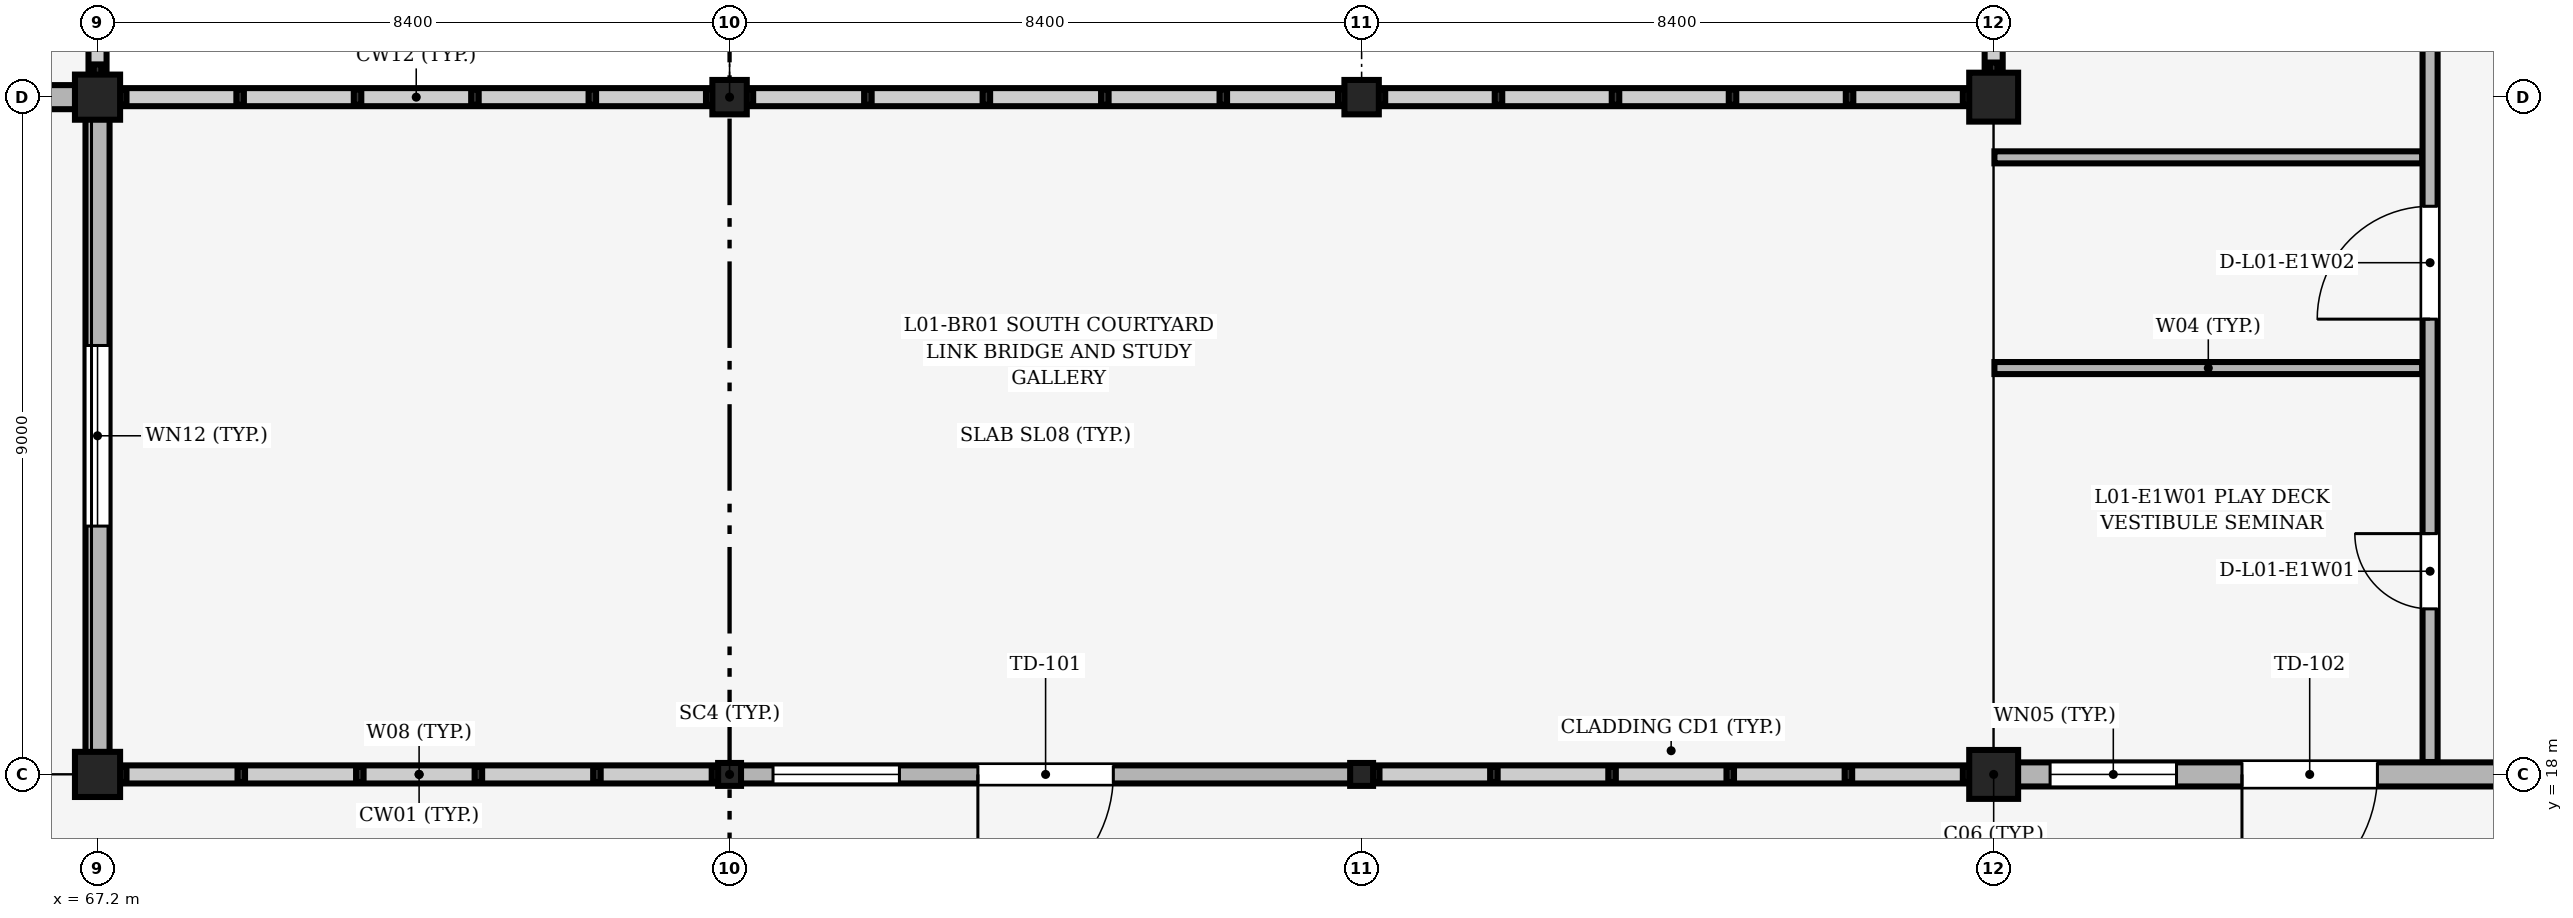
"""IFC4 building model, lengths in metres.
Left out: names, types, materials, properties, quantities, classifications, styles, units other than length and angle.
Written with IfcOpenShell. Run it as: python <this file> out.ifc"""

import sys

from ifc_helpers import new_model, si_unit, direction, frame, frame_2d, origin, origin_2d, place, context, subcontext, project, spatial, rectangle, hollow_rectangle, hollow_circle, extrude, element, fill, save


model = new_model("IFC4")
c1 = context("Model", 3, precision=1e-05, world=origin(), true_north=direction((0.0, 1.0)))
c2 = subcontext(c1, "Body", "Model", "MODEL_VIEW")
j1 = project(units=[si_unit("LENGTHUNIT", "METRE"), si_unit("PLANEANGLEUNIT", "RADIAN")], contexts=[c1])
p1 = place(None, origin())
s1 = spatial("IfcSite", under=j1, at=p1, CompositionType="ELEMENT")
p2 = place(p1, origin())
s2 = spatial("IfcBuilding", under=s1, at=p2, CompositionType="ELEMENT")
p3 = place(p2, frame((0.0, 0.0, 4.8)))
s3 = spatial("IfcBuildingStorey", under=s2, at=p3, CompositionType="ELEMENT", Elevation=4.8)
for number, where, z_axis, x_axis in (
    (1, (67.2, 18.0, 0.0), (0.0, 0.0, 1.0), (1.0, 0.0, 0.0)),
    (2, (67.2, 27.0, 0.0), (0.0, 0.0, 1.0), (1.0, 0.0, 0.0)),
):
    element("IfcColumn", number, at=place(p3, frame(where, z_axis=z_axis, x_axis=x_axis)), inside=s3, PredefinedType="COLUMN", context=c2, shape_type="SweptSolid", body=[
        extrude(rectangle(XDim=0.6, YDim=0.6, at=origin_2d()), origin(), (0.0, 0.0, 1.0), 4.2),
    ])
for number, where, z_axis, x_axis in (
    (3, (75.6, 18.0, 0.0), (0.0, 0.0, 1.0), (1.0, 0.0, 0.0)),
    (4, (84.0, 18.0, 0.0), (0.0, 0.0, 1.0), (1.0, 0.0, 0.0)),
):
    element("IfcColumn", number, at=place(p3, frame(where, z_axis=z_axis, x_axis=x_axis)), inside=s3, PredefinedType="COLUMN", context=c2, shape_type="SweptSolid", body=[
        extrude(hollow_rectangle(XDim=0.305, YDim=0.305, WallThickness=0.012, InnerFilletRadius=0.012, OuterFilletRadius=0.024, at=origin_2d()), origin(), (0.0, 0.0, 1.0), 4.2),
    ])
for number, where, z_axis, x_axis in (
    (5, (92.4, 18.0, 0.0), (0.0, 0.0, 1.0), (1.0, 0.0, 0.0)),
    (6, (92.4, 27.0, 0.0), (0.0, 0.0, 1.0), (1.0, 0.0, 0.0)),
):
    element("IfcColumn", number, at=place(p3, frame(where, z_axis=z_axis, x_axis=x_axis)), inside=s3, PredefinedType="COLUMN", context=c2, shape_type="SweptSolid", body=[
        extrude(rectangle(XDim=0.65, YDim=0.65, at=origin_2d()), origin(), (0.0, 0.0, 1.0), 4.2),
    ])
for number, where, z_axis, x_axis in (
    (7, (75.6, 27.0, 0.0), (0.0, 0.0, 1.0), (1.0, 0.0, 0.0)),
    (8, (84.0, 27.0, 0.0), (0.0, 0.0, 1.0), (1.0, 0.0, 0.0)),
):
    element("IfcColumn", number, at=place(p3, frame(where, z_axis=z_axis, x_axis=x_axis)), inside=s3, PredefinedType="USERDEFINED", context=c2, shape_type="SweptSolid", body=[
        extrude(hollow_circle(Radius=0.229, WallThickness=0.013, at=origin_2d()), origin(), (0.0, 0.0, 1.0), 4.2),
    ])
p4 = place(p3, frame((92.7, 18.0, 0.0), z_axis=(0.0, 0.0, 1.0), x_axis=(1.0, 0.0, 0.0)))
e9 = element("IfcWall", 9, at=p4, inside=s3, PredefinedType="SOLIDWALL", context=c2, shape_type="SweptSolid", body=[
    extrude(rectangle(XDim=7.8, YDim=0.32, at=frame_2d((3.9, 0.0))), origin(), (0.0, 0.0, 1.0), 3.15),
])
p5 = place(p4, frame((4.8, 0.0, 0.0), z_axis=(0.0, 0.0, 1.0), x_axis=(-1.0, 0.0, 0.0)))
e10 = element("IfcOpeningElement", 10, at=p5, cuts=e9, PredefinedType="OPENING", context=c2, shape_type="SweptSolid", body=[
    extrude(rectangle(XDim=1.8, YDim=2.3, at=frame_2d((0.9, 1.15))), frame((0.0, 0.17, 0.0), z_axis=(0.0, -1.0, 0.0), x_axis=(1.0, 0.0, 0.0)), (0.0, 0.0, 1.0), 0.34),
])
p6 = place(p4, frame((0.45, 0.0, 0.95)))
e11 = element("IfcOpeningElement", 11, at=p6, cuts=e9, PredefinedType="OPENING", context=c2, shape_type="SweptSolid", body=[
    extrude(rectangle(XDim=1.68, YDim=1.8, at=frame_2d((0.84, 0.9))), frame((0.0, 0.17, 0.0), z_axis=(0.0, -1.0, 0.0), x_axis=(1.0, 0.0, 0.0)), (0.0, 0.0, 1.0), 0.34),
])
p7 = place(p3, frame((59.075, 27.0, 0.0), z_axis=(0.0, 0.0, 1.0), x_axis=(1.0, 0.0, 0.0)))
e12 = element("IfcWall", 12, at=p7, inside=s3, PredefinedType="SOLIDWALL", context=c2, shape_type="SweptSolid", body=[
    extrude(rectangle(XDim=7.85, YDim=0.32, at=frame_2d((3.925, 0.0))), origin(), (0.0, 0.0, 1.0), 3.13),
])
p8 = place(p7, frame((0.45, 0.0, 0.9)))
e13 = element("IfcOpeningElement", 13, at=p8, cuts=e12, PredefinedType="OPENING", context=c2, shape_type="SweptSolid", body=[
    extrude(rectangle(XDim=1.2, YDim=1.5, at=frame_2d((0.6, 0.75))), frame((0.0, 0.17, 0.0), z_axis=(0.0, -1.0, 0.0), x_axis=(1.0, 0.0, 0.0)), (0.0, 0.0, 1.0), 0.34),
])
p9 = place(p7, frame((6.2, 0.0, 0.9)))
e14 = element("IfcOpeningElement", 14, at=p9, cuts=e12, PredefinedType="OPENING", context=c2, shape_type="SweptSolid", body=[
    extrude(rectangle(XDim=1.2, YDim=1.8, at=frame_2d((0.6, 0.9))), frame((0.0, 0.17, 0.0), z_axis=(0.0, -1.0, 0.0), x_axis=(1.0, 0.0, 0.0)), (0.0, 0.0, 1.0), 0.34),
])
p10 = place(p3, frame((67.2, 18.275, 0.0), z_axis=(0.0, 0.0, 1.0), x_axis=(0.0, 1.0, 0.0)))
e15 = element("IfcWall", 15, at=p10, inside=s3, PredefinedType="SOLIDWALL", context=c2, shape_type="SweptSolid", body=[
    extrude(rectangle(XDim=8.45, YDim=0.32, at=frame_2d((4.225, 0.0))), origin(), (0.0, 0.0, 1.0), 3.43),
])
p11 = place(p10, frame((3.025, 0.0, 0.9)))
e16 = element("IfcOpeningElement", 16, at=p11, cuts=e15, PredefinedType="OPENING", context=c2, shape_type="SweptSolid", body=[
    extrude(rectangle(XDim=2.4, YDim=1.8, at=frame_2d((1.2, 0.9))), frame((0.0, 0.17, 0.0), z_axis=(0.0, -1.0, 0.0), x_axis=(1.0, 0.0, 0.0)), (0.0, 0.0, 1.0), 0.34),
])
p12 = place(p3, frame((67.475, 18.0, 0.0), z_axis=(0.0, 0.0, 1.0), x_axis=(1.0, 0.0, 0.0)))
e17 = element("IfcWall", 17, at=p12, inside=s3, PredefinedType="SOLIDWALL", context=c2, shape_type="SweptSolid", body=[
    extrude(rectangle(XDim=7.998, YDim=0.24, at=frame_2d((3.999, 0.0))), origin(), (0.0, 0.0, 1.0), 1.1),
])
p13 = place(p3, frame((75.727, 18.0, 0.0), z_axis=(0.0, 0.0, 1.0), x_axis=(1.0, 0.0, 0.0)))
e18 = element("IfcWall", 18, at=p13, inside=s3, PredefinedType="SOLIDWALL", context=c2, shape_type="SweptSolid", body=[
    extrude(rectangle(XDim=8.145, YDim=0.24, at=frame_2d((4.073, 0.0))), origin(), (0.0, 0.0, 1.0), 3.296),
])
p14 = place(p13, frame((4.973, 0.0, 0.0), z_axis=(0.0, 0.0, 1.0), x_axis=(-1.0, 0.0, 0.0)))
e19 = element("IfcOpeningElement", 19, at=p14, cuts=e18, PredefinedType="OPENING", context=c2, shape_type="SweptSolid", body=[
    extrude(rectangle(XDim=1.8, YDim=2.3, at=frame_2d((0.9, 1.15))), frame((0.0, 0.13, 0.0), z_axis=(0.0, -1.0, 0.0), x_axis=(1.0, 0.0, 0.0)), (0.0, 0.0, 1.0), 0.26),
])
p15 = place(p13, frame((0.45, 0.0, 0.95)))
e20 = element("IfcOpeningElement", 20, at=p15, cuts=e18, PredefinedType="OPENING", context=c2, shape_type="SweptSolid", body=[
    extrude(rectangle(XDim=1.68, YDim=1.8, at=frame_2d((0.84, 0.9))), frame((0.0, 0.13, 0.0), z_axis=(0.0, -1.0, 0.0), x_axis=(1.0, 0.0, 0.0)), (0.0, 0.0, 1.0), 0.26),
])
p16 = place(p3, frame((84.127, 18.0, 0.0), z_axis=(0.0, 0.0, 1.0), x_axis=(1.0, 0.0, 0.0)))
e21 = element("IfcWall", 21, at=p16, inside=s3, PredefinedType="SOLIDWALL", context=c2, shape_type="SweptSolid", body=[
    extrude(rectangle(XDim=7.973, YDim=0.24, at=frame_2d((3.986, 0.0))), origin(), (0.0, 0.0, 1.0), 1.1),
])
p17 = place(p3, frame((67.2, 27.275, 0.0), z_axis=(0.0, 0.0, 1.0), x_axis=(0.0, 1.0, 0.0)))
e22 = element("IfcWall", 22, at=p17, inside=s3, PredefinedType="SOLIDWALL", context=c2, shape_type="SweptSolid", body=[
    extrude(rectangle(XDim=7.85, YDim=0.24, at=frame_2d((3.925, 0.0))), origin(), (0.0, 0.0, 1.0), 1.15),
])
p18 = place(p3, frame((92.4, 27.3, 0.0), z_axis=(0.0, 0.0, 1.0), x_axis=(0.0, 1.0, 0.0)))
e23 = element("IfcWall", 23, at=p18, inside=s3, PredefinedType="SOLIDWALL", context=c2, shape_type="SweptSolid", body=[
    extrude(rectangle(XDim=7.8, YDim=0.24, at=frame_2d((3.9, 0.0))), origin(), (0.0, 0.0, 1.0), 1.15),
])
p19 = place(p3, frame((67.475, 27.0, 0.0), z_axis=(0.0, 0.0, 1.0), x_axis=(1.0, 0.0, 0.0)))
e24 = element("IfcWall", 24, at=p19, inside=s3, PredefinedType="SOLIDWALL", context=c2, shape_type="SweptSolid", body=[
    extrude(rectangle(XDim=7.921, YDim=0.24, at=frame_2d((3.961, 0.0))), origin(), (0.0, 0.0, 1.0), 1.1),
])
p20 = place(p3, frame((75.804, 27.0, 0.0), z_axis=(0.0, 0.0, 1.0), x_axis=(1.0, 0.0, 0.0)))
e25 = element("IfcWall", 25, at=p20, inside=s3, PredefinedType="SOLIDWALL", context=c2, shape_type="SweptSolid", body=[
    extrude(rectangle(XDim=7.993, YDim=0.24, at=frame_2d((3.996, 0.0))), origin(), (0.0, 0.0, 1.0), 1.1),
])
p21 = place(p3, frame((84.204, 27.0, 0.0), z_axis=(0.0, 0.0, 1.0), x_axis=(1.0, 0.0, 0.0)))
e26 = element("IfcWall", 26, at=p21, inside=s3, PredefinedType="SOLIDWALL", context=c2, shape_type="SweptSolid", body=[
    extrude(rectangle(XDim=7.896, YDim=0.24, at=frame_2d((3.948, 0.0))), origin(), (0.0, 0.0, 1.0), 1.1),
])
for number, where, z_axis, x_axis in (
    (27, (92.41, 23.4, 0.0), (0.0, 0.0, 1.0), (1.0, 0.0, 0.0)),
    (28, (92.41, 26.2, 0.0), (0.0, 0.0, 1.0), (1.0, 0.0, 0.0)),
):
    element("IfcWall", number, at=place(p3, frame(where, z_axis=z_axis, x_axis=x_axis)), inside=s3, PredefinedType="PARTITIONING", context=c2, shape_type="SweptSolid", body=[
        extrude(rectangle(XDim=5.685, YDim=0.16, at=frame_2d((2.843, 0.0))), origin(), (0.0, 0.0, 1.0), 3.9),
    ])
p22 = place(p3, frame((98.2, 18.165, 0.0), z_axis=(0.0, 0.0, 1.0), x_axis=(0.0, 1.0, 0.0)))
e29 = element("IfcWall", 29, at=p22, inside=s3, PredefinedType="PARTITIONING", context=c2, shape_type="SweptSolid", body=[
    extrude(rectangle(XDim=67.625, YDim=0.2, at=frame_2d((33.812, 0.0))), origin(), (0.0, 0.0, 1.0), 3.9),
])
p23 = place(p22, frame((2.035, 0.0, 0.0)))
e30 = element("IfcOpeningElement", 30, at=p23, cuts=e29, PredefinedType="OPENING", context=c2, shape_type="SweptSolid", body=[
    extrude(rectangle(XDim=1.0, YDim=2.15, at=frame_2d((0.5, 1.075))), frame((0.0, 0.11, 0.0), z_axis=(0.0, -1.0, 0.0), x_axis=(1.0, 0.0, 0.0)), (0.0, 0.0, 1.0), 0.22),
])
p24 = place(p22, frame((5.885, 0.0, 0.0)))
e31 = element("IfcOpeningElement", 31, at=p24, cuts=e29, PredefinedType="OPENING", context=c2, shape_type="SweptSolid", body=[
    extrude(rectangle(XDim=1.5, YDim=2.2, at=frame_2d((0.75, 1.1))), frame((0.0, 0.11, 0.0), z_axis=(0.0, -1.0, 0.0), x_axis=(1.0, 0.0, 0.0)), (0.0, 0.0, 1.0), 0.22),
])
p25 = place(p22, frame((13.335, 0.0, 0.0)))
e32 = element("IfcOpeningElement", 32, at=p25, cuts=e29, PredefinedType="OPENING", context=c2, shape_type="SweptSolid", body=[
    extrude(rectangle(XDim=1.0, YDim=2.15, at=frame_2d((0.5, 1.075))), frame((0.0, 0.11, 0.0), z_axis=(0.0, -1.0, 0.0), x_axis=(1.0, 0.0, 0.0)), (0.0, 0.0, 1.0), 0.22),
])
p26 = place(p22, frame((23.335, 0.0, 0.0)))
e33 = element("IfcOpeningElement", 33, at=p26, cuts=e29, PredefinedType="OPENING", context=c2, shape_type="SweptSolid", body=[
    extrude(rectangle(XDim=1.0, YDim=2.15, at=frame_2d((0.5, 1.075))), frame((0.0, 0.11, 0.0), z_axis=(0.0, -1.0, 0.0), x_axis=(1.0, 0.0, 0.0)), (0.0, 0.0, 1.0), 0.22),
])
p27 = place(p22, frame((30.46, 0.0, 0.0)))
e34 = element("IfcOpeningElement", 34, at=p27, cuts=e29, PredefinedType="OPENING", context=c2, shape_type="SweptSolid", body=[
    extrude(rectangle(XDim=0.95, YDim=2.2, at=frame_2d((0.475, 1.1))), frame((0.0, 0.11, 0.0), z_axis=(0.0, -1.0, 0.0), x_axis=(1.0, 0.0, 0.0)), (0.0, 0.0, 1.0), 0.22),
])
p28 = place(p22, frame((36.26, 0.0, 0.0)))
e35 = element("IfcOpeningElement", 35, at=p28, cuts=e29, PredefinedType="OPENING", context=c2, shape_type="SweptSolid", body=[
    extrude(rectangle(XDim=0.95, YDim=2.2, at=frame_2d((0.475, 1.1))), frame((0.0, 0.11, 0.0), z_axis=(0.0, -1.0, 0.0), x_axis=(1.0, 0.0, 0.0)), (0.0, 0.0, 1.0), 0.22),
])
p29 = place(p22, frame((41.36, 0.0, 0.0)))
e36 = element("IfcOpeningElement", 36, at=p29, cuts=e29, PredefinedType="OPENING", context=c2, shape_type="SweptSolid", body=[
    extrude(rectangle(XDim=0.95, YDim=2.1, at=frame_2d((0.475, 1.05))), frame((0.0, 0.11, 0.0), z_axis=(0.0, -1.0, 0.0), x_axis=(1.0, 0.0, 0.0)), (0.0, 0.0, 1.0), 0.22),
])
p30 = place(p22, frame((49.735, 0.0, 0.0)))
e37 = element("IfcOpeningElement", 37, at=p30, cuts=e29, PredefinedType="OPENING", context=c2, shape_type="SweptSolid", body=[
    extrude(rectangle(XDim=1.0, YDim=2.15, at=frame_2d((0.5, 1.075))), frame((0.0, 0.11, 0.0), z_axis=(0.0, -1.0, 0.0), x_axis=(1.0, 0.0, 0.0)), (0.0, 0.0, 1.0), 0.22),
])
p31 = place(p22, frame((61.535, 0.0, 0.0)))
e38 = element("IfcOpeningElement", 38, at=p31, cuts=e29, PredefinedType="OPENING", context=c2, shape_type="SweptSolid", body=[
    extrude(rectangle(XDim=1.0, YDim=2.15, at=frame_2d((0.5, 1.075))), frame((0.0, 0.11, 0.0), z_axis=(0.0, -1.0, 0.0), x_axis=(1.0, 0.0, 0.0)), (0.0, 0.0, 1.0), 0.22),
])
p32 = place(p5, origin())
e39 = element("IfcDoor", 39, at=p32, inside=s3, OperationType="DOUBLE_DOOR_SINGLE_SWING", PredefinedType="DOOR", context=c2, shape_type="SweptSolid", body=[
    extrude(rectangle(XDim=1.8, YDim=2.3, at=frame_2d((0.9, 1.15))), frame((0.0, 0.025, 0.0), z_axis=(0.0, -1.0, 0.0), x_axis=(1.0, 0.0, 0.0)), (0.0, 0.0, 1.0), 0.05),
])
fill(e10, e39)
p33 = place(p6, origin())
e40 = element("IfcWindow", 40, at=p33, inside=s3, PartitioningType="SINGLE_PANEL", PredefinedType="WINDOW", context=c2, shape_type="SweptSolid", body=[
    extrude(rectangle(XDim=1.68, YDim=1.8, at=frame_2d((0.84, 0.9))), frame((0.0, 0.03, 0.0), z_axis=(0.0, -1.0, 0.0), x_axis=(1.0, 0.0, 0.0)), (0.0, 0.0, 1.0), 0.06),
])
fill(e11, e40)
p34 = place(p11, origin())
e41 = element("IfcWindow", 41, at=p34, inside=s3, PartitioningType="SINGLE_PANEL", PredefinedType="WINDOW", context=c2, shape_type="SweptSolid", body=[
    extrude(rectangle(XDim=2.4, YDim=1.8, at=frame_2d((1.2, 0.9))), frame((0.0, 0.03, 0.0), z_axis=(0.0, -1.0, 0.0), x_axis=(1.0, 0.0, 0.0)), (0.0, 0.0, 1.0), 0.06),
])
fill(e16, e41)
p35 = place(p14, origin())
e42 = element("IfcDoor", 42, at=p35, inside=s3, OperationType="DOUBLE_DOOR_SINGLE_SWING", PredefinedType="DOOR", context=c2, shape_type="SweptSolid", body=[
    extrude(rectangle(XDim=1.8, YDim=2.3, at=frame_2d((0.9, 1.15))), frame((0.0, 0.025, 0.0), z_axis=(0.0, -1.0, 0.0), x_axis=(1.0, 0.0, 0.0)), (0.0, 0.0, 1.0), 0.05),
])
fill(e19, e42)
p36 = place(p15, origin())
e43 = element("IfcWindow", 43, at=p36, inside=s3, PartitioningType="SINGLE_PANEL", PredefinedType="WINDOW", context=c2, shape_type="SweptSolid", body=[
    extrude(rectangle(XDim=1.68, YDim=1.8, at=frame_2d((0.84, 0.9))), frame((0.0, 0.03, 0.0), z_axis=(0.0, -1.0, 0.0), x_axis=(1.0, 0.0, 0.0)), (0.0, 0.0, 1.0), 0.06),
])
fill(e20, e43)
p37 = place(p23, origin())
e44 = element("IfcDoor", 44, at=p37, inside=s3, OperationType="SINGLE_SWING_RIGHT", PredefinedType="DOOR", context=c2, shape_type="SweptSolid", body=[
    extrude(rectangle(XDim=1.0, YDim=2.15, at=frame_2d((0.5, 1.075))), frame((0.0, 0.025, 0.0), z_axis=(0.0, -1.0, 0.0), x_axis=(1.0, 0.0, 0.0)), (0.0, 0.0, 1.0), 0.05),
])
fill(e30, e44)
p38 = place(p24, origin())
e45 = element("IfcDoor", 45, at=p38, inside=s3, OperationType="DOUBLE_DOOR_SINGLE_SWING", PredefinedType="DOOR", context=c2, shape_type="SweptSolid", body=[
    extrude(rectangle(XDim=1.5, YDim=2.2, at=frame_2d((0.75, 1.1))), frame((0.0, 0.025, 0.0), z_axis=(0.0, -1.0, 0.0), x_axis=(1.0, 0.0, 0.0)), (0.0, 0.0, 1.0), 0.05),
])
fill(e31, e45)
save(model, sys.argv[1])
